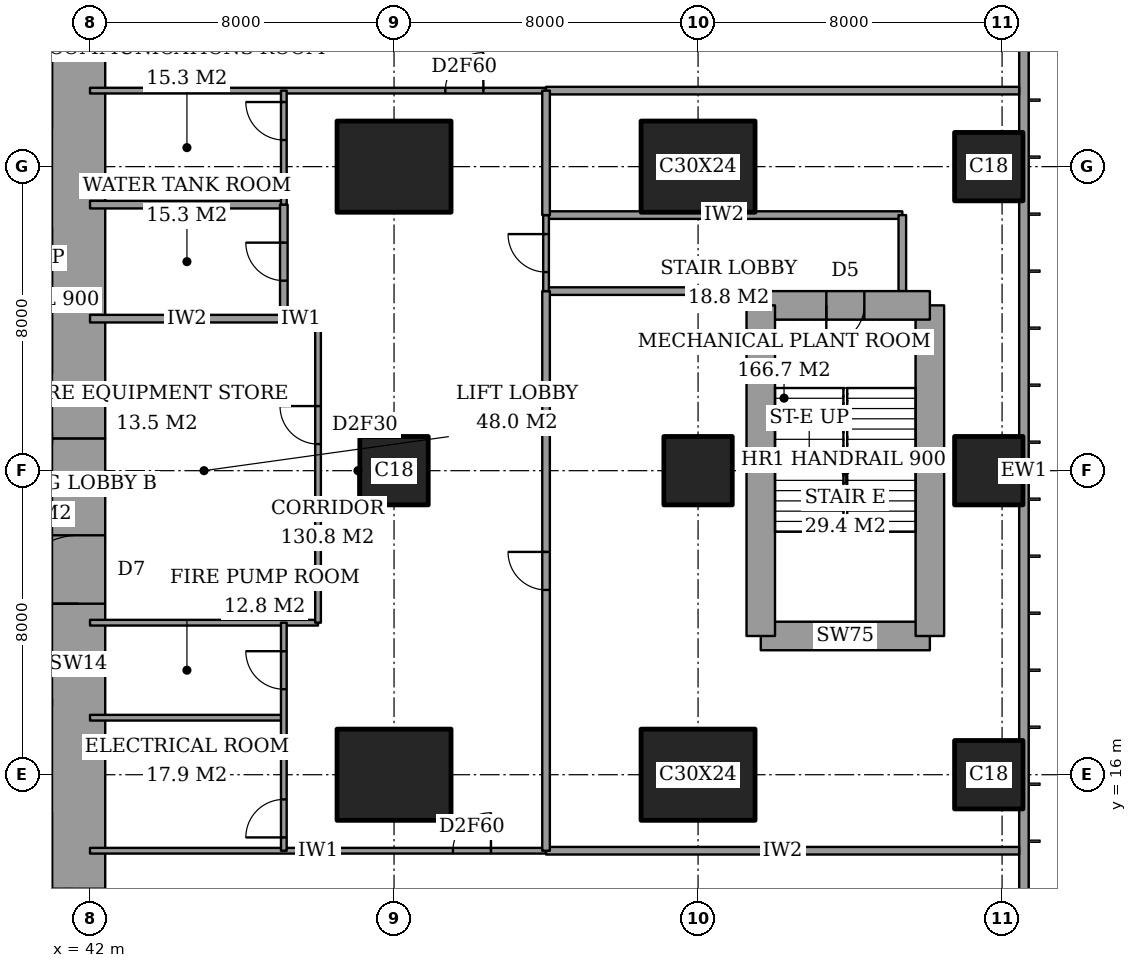
"""IFC4 building model, lengths in metres.
Left out: names, types, materials, properties, quantities, classifications, styles, units other than length and angle.
Written with IfcOpenShell. Run it as: python <this file> out.ifc"""

import sys

from ifc_helpers import new_model, si_unit, direction, frame, frame_2d, origin, origin_2d, place, context, subcontext, project, spatial, rectangle, extrude, element, fill, save


model = new_model("IFC4")
c1 = context("Model", 3, precision=1e-05, world=origin(), true_north=direction((0.0, 1.0)))
c2 = subcontext(c1, "Body", "Model", "MODEL_VIEW")
j1 = project(units=[si_unit("LENGTHUNIT", "METRE"), si_unit("PLANEANGLEUNIT", "RADIAN")], contexts=[c1])
p1 = place(None, origin())
s1 = spatial("IfcSite", under=j1, at=p1, CompositionType="ELEMENT")
p2 = place(p1, origin())
s2 = spatial("IfcBuilding", under=s1, at=p2, CompositionType="ELEMENT")
p3 = place(p2, frame((0.0, 0.0, 171.8)))
s3 = spatial("IfcBuildingStorey", under=s2, at=p3, CompositionType="ELEMENT", Elevation=171.8)
p4 = place(p3, frame((50.0, 16.0, 0.0), z_axis=(0.0, 0.0, 1.0), x_axis=(1.0, 0.0, 0.0)))
e1 = element("IfcColumn", 1, at=p4, inside=s3, PredefinedType="COLUMN", context=c2, shape_type="SweptSolid", body=[
    extrude(rectangle(XDim=3.0, YDim=2.4, at=origin_2d()), origin(), (0.0, 0.0, 1.0), 5.4),
])
p5 = place(p3, frame((50.0, 24.0, 0.0), z_axis=(0.0, 0.0, 1.0), x_axis=(1.0, 0.0, 0.0)))
e2 = element("IfcColumn", 2, at=p5, inside=s3, PredefinedType="COLUMN", context=c2, shape_type="SweptSolid", body=[
    extrude(rectangle(XDim=1.8, YDim=1.8, at=origin_2d()), origin(), (0.0, 0.0, 1.0), 5.4),
])
for number, where, z_axis, x_axis in (
    (3, (50.0, 32.0, 0.0), (0.0, 0.0, 1.0), (1.0, 0.0, 0.0)),
    (4, (58.0, 16.0, 0.0), (0.0, 0.0, 1.0), (1.0, 0.0, 0.0)),
):
    element("IfcColumn", number, at=place(p3, frame(where, z_axis=z_axis, x_axis=x_axis)), inside=s3, PredefinedType="COLUMN", context=c2, shape_type="SweptSolid", body=[
        extrude(rectangle(XDim=3.0, YDim=2.4, at=origin_2d()), origin(), (0.0, 0.0, 1.0), 5.4),
    ])
p6 = place(p3, frame((58.0, 24.0, 0.0), z_axis=(0.0, 0.0, 1.0), x_axis=(1.0, 0.0, 0.0)))
e5 = element("IfcColumn", 5, at=p6, inside=s3, PredefinedType="COLUMN", context=c2, shape_type="SweptSolid", body=[
    extrude(rectangle(XDim=1.8, YDim=1.8, at=origin_2d()), origin(), (0.0, 0.0, 1.0), 5.4),
])
p7 = place(p3, frame((58.0, 32.0, 0.0), z_axis=(0.0, 0.0, 1.0), x_axis=(1.0, 0.0, 0.0)))
e6 = element("IfcColumn", 6, at=p7, inside=s3, PredefinedType="COLUMN", context=c2, shape_type="SweptSolid", body=[
    extrude(rectangle(XDim=3.0, YDim=2.4, at=origin_2d()), origin(), (0.0, 0.0, 1.0), 5.4),
])
for number, where, z_axis, x_axis in (
    (7, (65.65, 16.0, 0.0), (0.0, 0.0, 1.0), (1.0, 0.0, 0.0)),
    (8, (65.65, 24.0, 0.0), (0.0, 0.0, 1.0), (1.0, 0.0, 0.0)),
    (9, (65.65, 32.0, 0.0), (0.0, 0.0, 1.0), (1.0, 0.0, 0.0)),
):
    element("IfcColumn", number, at=place(p3, frame(where, z_axis=z_axis, x_axis=x_axis)), inside=s3, PredefinedType="COLUMN", context=c2, shape_type="SweptSolid", body=[
        extrude(rectangle(XDim=1.8, YDim=1.8, at=origin_2d()), origin(), (0.0, 0.0, 1.0), 5.4),
    ])
p8 = place(p3, frame((41.7, 13.0, 0.0), z_axis=(0.0, 0.0, 1.0), x_axis=(0.0, 1.0, 0.0)))
e10 = element("IfcWall", 10, at=p8, inside=s3, PredefinedType="SHEAR", context=c2, shape_type="SweptSolid", body=[
    extrude(rectangle(XDim=11.85, YDim=1.4, at=frame_2d((5.925, 0.0))), origin(), (0.0, 0.0, 1.0), 5.4),
])
p9 = place(p8, frame((7.5, 0.0, 0.0)))
e11 = element("IfcOpeningElement", 11, at=p9, cuts=e10, PredefinedType="OPENING", context=c2, shape_type="SweptSolid", body=[
    extrude(rectangle(XDim=1.8, YDim=2.4, at=frame_2d((0.9, 1.2))), frame((0.0, 0.71, 0.0), z_axis=(0.0, -1.0, 0.0), x_axis=(1.0, 0.0, 0.0)), (0.0, 0.0, 1.0), 1.42),
])
p10 = place(p3, frame((41.7, 24.85, 0.0), z_axis=(0.0, 0.0, 1.0), x_axis=(0.0, 1.0, 0.0)))
e12 = element("IfcWall", 12, at=p10, inside=s3, PredefinedType="SHEAR", context=c2, shape_type="SweptSolid", body=[
    extrude(rectangle(XDim=10.15, YDim=1.4, at=frame_2d((5.075, 0.0))), origin(), (0.0, 0.0, 1.0), 5.4),
])
p11 = place(p3, frame((59.65, 19.65, 0.0), z_axis=(0.0, 0.0, 1.0), x_axis=(1.0, 0.0, 0.0)))
e13 = element("IfcWall", 13, at=p11, inside=s3, PredefinedType="SHEAR", context=c2, shape_type="SweptSolid", body=[
    extrude(rectangle(XDim=4.45, YDim=0.75, at=frame_2d((2.225, 0.0))), origin(), (0.0, 0.0, 1.0), 5.4),
])
p12 = place(p3, frame((64.1, 19.65, 0.0), z_axis=(0.0, 0.0, 1.0), x_axis=(0.0, 1.0, 0.0)))
e14 = element("IfcWall", 14, at=p12, inside=s3, PredefinedType="SHEAR", context=c2, shape_type="SweptSolid", body=[
    extrude(rectangle(XDim=8.7, YDim=0.75, at=frame_2d((4.35, 0.0))), origin(), (0.0, 0.0, 1.0), 5.4),
])
p13 = place(p3, frame((64.1, 28.35, 0.0), z_axis=(0.0, 0.0, 1.0), x_axis=(-1.0, 0.0, 0.0)))
e15 = element("IfcWall", 15, at=p13, inside=s3, PredefinedType="SHEAR", context=c2, shape_type="SweptSolid", body=[
    extrude(rectangle(XDim=4.45, YDim=0.75, at=frame_2d((2.225, 0.0))), origin(), (0.0, 0.0, 1.0), 5.4),
])
p14 = place(p13, frame((1.725, 0.0, 0.0)))
e16 = element("IfcOpeningElement", 16, at=p14, cuts=e15, PredefinedType="OPENING", context=c2, shape_type="SweptSolid", body=[
    extrude(rectangle(XDim=1.0, YDim=2.1, at=frame_2d((0.5, 1.05))), frame((0.0, 0.385, 0.0), z_axis=(0.0, -1.0, 0.0), x_axis=(1.0, 0.0, 0.0)), (0.0, 0.0, 1.0), 0.77),
])
p15 = place(p3, frame((59.65, 28.35, 0.0), z_axis=(0.0, 0.0, 1.0), x_axis=(0.0, -1.0, 0.0)))
e17 = element("IfcWall", 17, at=p15, inside=s3, PredefinedType="SHEAR", context=c2, shape_type="SweptSolid", body=[
    extrude(rectangle(XDim=8.7, YDim=0.75, at=frame_2d((4.35, 0.0))), origin(), (0.0, 0.0, 1.0), 5.4),
])
p16 = place(p3, frame((66.575, 3.175, 0.0), z_axis=(0.0, 0.0, 1.0), x_axis=(0.0, 1.0, 0.0)))
e18 = element("IfcWall", 18, at=p16, inside=s3, PredefinedType="SOLIDWALL", context=c2, shape_type="SweptSolid", body=[
    extrude(rectangle(XDim=41.65, YDim=0.25, at=frame_2d((20.825, 0.0))), origin(), (0.0, 0.0, 1.0), 5.4),
])
p17 = place(p16, frame((0.825, 0.0, 0.9)))
e19 = element("IfcOpeningElement", 19, at=p17, cuts=e18, PredefinedType="OPENING", context=c2, shape_type="SweptSolid", body=[
    extrude(rectangle(XDim=2.4, YDim=2.4, at=frame_2d((1.2, 1.2))), frame((0.0, 0.135, 0.0), z_axis=(0.0, -1.0, 0.0), x_axis=(1.0, 0.0, 0.0)), (0.0, 0.0, 1.0), 0.27),
])
p18 = place(p16, frame((38.425, 0.0, 0.9)))
e20 = element("IfcOpeningElement", 20, at=p18, cuts=e18, PredefinedType="OPENING", context=c2, shape_type="SweptSolid", body=[
    extrude(rectangle(XDim=2.4, YDim=2.4, at=frame_2d((1.2, 1.2))), frame((0.0, 0.135, 0.0), z_axis=(0.0, -1.0, 0.0), x_axis=(1.0, 0.0, 0.0)), (0.0, 0.0, 1.0), 0.27),
])
p19 = place(p3, frame((54.0, 14.0, 0.0), z_axis=(0.0, 0.0, 1.0), x_axis=(1.0, 0.0, 0.0)))
e21 = element("IfcWall", 21, at=p19, inside=s3, PredefinedType="PARTITIONING", context=c2, shape_type="SweptSolid", body=[
    extrude(rectangle(XDim=12.45, YDim=0.2, at=frame_2d((6.225, 0.0))), origin(), (0.0, 0.0, 1.0), 5.15),
])
p20 = place(p3, frame((42.0, 14.0, 0.0), z_axis=(0.0, 0.0, 1.0), x_axis=(1.0, 0.0, 0.0)))
e22 = element("IfcWall", 22, at=p20, inside=s3, PredefinedType="PARTITIONING", context=c2, shape_type="SweptSolid", body=[
    extrude(rectangle(XDim=12.0, YDim=0.15, at=frame_2d((6.0, 0.0))), origin(), (0.0, 0.0, 1.0), 5.15),
])
p21 = place(p20, frame((9.55, 0.0, 0.0)))
e23 = element("IfcOpeningElement", 23, at=p21, cuts=e22, PredefinedType="OPENING", context=c2, shape_type="SweptSolid", body=[
    extrude(rectangle(XDim=1.0, YDim=2.1, at=frame_2d((0.5, 1.05))), frame((0.0, 0.085, 0.0), z_axis=(0.0, -1.0, 0.0), x_axis=(1.0, 0.0, 0.0)), (0.0, 0.0, 1.0), 0.17),
])
p22 = place(p3, frame((42.0, 17.5, 0.0), z_axis=(0.0, 0.0, 1.0), x_axis=(1.0, 0.0, 0.0)))
e24 = element("IfcWall", 24, at=p22, inside=s3, PredefinedType="PARTITIONING", context=c2, shape_type="SweptSolid", body=[
    extrude(rectangle(XDim=5.1, YDim=0.15, at=frame_2d((2.55, 0.0))), origin(), (0.0, 0.0, 1.0), 5.15),
])
p23 = place(p3, frame((42.0, 20.0, 0.0), z_axis=(0.0, 0.0, 1.0), x_axis=(1.0, 0.0, 0.0)))
e25 = element("IfcWall", 25, at=p23, inside=s3, PredefinedType="PARTITIONING", context=c2, shape_type="SweptSolid", body=[
    extrude(rectangle(XDim=6.0, YDim=0.15, at=frame_2d((3.0, 0.0))), origin(), (0.0, 0.0, 1.0), 5.15),
])
p24 = place(p3, frame((42.0, 28.0, 0.0), z_axis=(0.0, 0.0, 1.0), x_axis=(1.0, 0.0, 0.0)))
e26 = element("IfcWall", 26, at=p24, inside=s3, PredefinedType="PARTITIONING", context=c2, shape_type="SweptSolid", body=[
    extrude(rectangle(XDim=5.1, YDim=0.2, at=frame_2d((2.55, 0.0))), origin(), (0.0, 0.0, 1.0), 5.15),
])
p25 = place(p3, frame((47.1, 28.0, 0.0), z_axis=(0.0, 0.0, 1.0), x_axis=(1.0, 0.0, 0.0)))
e27 = element("IfcWall", 27, at=p25, inside=s3, PredefinedType="PARTITIONING", context=c2, shape_type="SweptSolid", body=[
    extrude(rectangle(XDim=0.9, YDim=0.15, at=frame_2d((0.45, 0.0))), origin(), (0.0, 0.0, 1.0), 5.15),
])
p26 = place(p3, frame((54.0, 28.725, 0.0), z_axis=(0.0, 0.0, 1.0), x_axis=(1.0, 0.0, 0.0)))
e28 = element("IfcWall", 28, at=p26, inside=s3, PredefinedType="PARTITIONING", context=c2, shape_type="SweptSolid", body=[
    extrude(rectangle(XDim=5.65, YDim=0.2, at=frame_2d((2.825, 0.0))), origin(), (0.0, 0.0, 1.0), 5.15),
])
p27 = place(p3, frame((54.0, 30.725, 0.0), z_axis=(0.0, 0.0, 1.0), x_axis=(1.0, 0.0, 0.0)))
e29 = element("IfcWall", 29, at=p27, inside=s3, PredefinedType="PARTITIONING", context=c2, shape_type="SweptSolid", body=[
    extrude(rectangle(XDim=9.375, YDim=0.2, at=frame_2d((4.688, 0.0))), origin(), (0.0, 0.0, 1.0), 5.15),
])
p28 = place(p3, frame((42.0, 31.0, 0.0), z_axis=(0.0, 0.0, 1.0), x_axis=(1.0, 0.0, 0.0)))
e30 = element("IfcWall", 30, at=p28, inside=s3, PredefinedType="PARTITIONING", context=c2, shape_type="SweptSolid", body=[
    extrude(rectangle(XDim=5.1, YDim=0.2, at=frame_2d((2.55, 0.0))), origin(), (0.0, 0.0, 1.0), 5.15),
])
p29 = place(p3, frame((54.0, 34.0, 0.0), z_axis=(0.0, 0.0, 1.0), x_axis=(1.0, 0.0, 0.0)))
e31 = element("IfcWall", 31, at=p29, inside=s3, PredefinedType="PARTITIONING", context=c2, shape_type="SweptSolid", body=[
    extrude(rectangle(XDim=12.45, YDim=0.2, at=frame_2d((6.225, 0.0))), origin(), (0.0, 0.0, 1.0), 5.15),
])
p30 = place(p3, frame((42.0, 34.0, 0.0), z_axis=(0.0, 0.0, 1.0), x_axis=(1.0, 0.0, 0.0)))
e32 = element("IfcWall", 32, at=p30, inside=s3, PredefinedType="PARTITIONING", context=c2, shape_type="SweptSolid", body=[
    extrude(rectangle(XDim=12.0, YDim=0.15, at=frame_2d((6.0, 0.0))), origin(), (0.0, 0.0, 1.0), 5.15),
])
p31 = place(p30, frame((9.35, 0.0, 0.0)))
e33 = element("IfcOpeningElement", 33, at=p31, cuts=e32, PredefinedType="OPENING", context=c2, shape_type="SweptSolid", body=[
    extrude(rectangle(XDim=1.0, YDim=2.1, at=frame_2d((0.5, 1.05))), frame((0.0, 0.085, 0.0), z_axis=(0.0, -1.0, 0.0), x_axis=(1.0, 0.0, 0.0)), (0.0, 0.0, 1.0), 0.17),
])
p32 = place(p3, frame((47.1, 28.0, 0.0), z_axis=(0.0, 0.0, 1.0), x_axis=(0.0, 1.0, 0.0)))
e34 = element("IfcWall", 34, at=p32, inside=s3, PredefinedType="PARTITIONING", context=c2, shape_type="SweptSolid", body=[
    extrude(rectangle(XDim=3.0, YDim=0.2, at=frame_2d((1.5, 0.0))), origin(), (0.0, 0.0, 1.0), 5.15),
])
p33 = place(p32, frame((1.0, 0.0, 0.0)))
e35 = element("IfcOpeningElement", 35, at=p33, cuts=e34, PredefinedType="OPENING", context=c2, shape_type="SweptSolid", body=[
    extrude(rectangle(XDim=1.0, YDim=2.1, at=frame_2d((0.5, 1.05))), frame((0.0, 0.11, 0.0), z_axis=(0.0, -1.0, 0.0), x_axis=(1.0, 0.0, 0.0)), (0.0, 0.0, 1.0), 0.22),
])
p34 = place(p3, frame((47.1, 14.0, 0.0), z_axis=(0.0, 0.0, 1.0), x_axis=(0.0, 1.0, 0.0)))
e36 = element("IfcWall", 36, at=p34, inside=s3, PredefinedType="PARTITIONING", context=c2, shape_type="SweptSolid", body=[
    extrude(rectangle(XDim=6.0, YDim=0.15, at=frame_2d((3.0, 0.0))), origin(), (0.0, 0.0, 1.0), 5.15),
])
p35 = place(p34, frame((0.35, 0.0, 0.0)))
e37 = element("IfcOpeningElement", 37, at=p35, cuts=e36, PredefinedType="OPENING", context=c2, shape_type="SweptSolid", body=[
    extrude(rectangle(XDim=1.0, YDim=2.1, at=frame_2d((0.5, 1.05))), frame((0.0, 0.085, 0.0), z_axis=(0.0, -1.0, 0.0), x_axis=(1.0, 0.0, 0.0)), (0.0, 0.0, 1.0), 0.17),
])
p36 = place(p34, frame((4.25, 0.0, 0.0)))
e38 = element("IfcOpeningElement", 38, at=p36, cuts=e36, PredefinedType="OPENING", context=c2, shape_type="SweptSolid", body=[
    extrude(rectangle(XDim=1.0, YDim=2.1, at=frame_2d((0.5, 1.05))), frame((0.0, 0.085, 0.0), z_axis=(0.0, -1.0, 0.0), x_axis=(1.0, 0.0, 0.0)), (0.0, 0.0, 1.0), 0.17),
])
p37 = place(p3, frame((47.1, 31.0, 0.0), z_axis=(0.0, 0.0, 1.0), x_axis=(0.0, 1.0, 0.0)))
e39 = element("IfcWall", 39, at=p37, inside=s3, PredefinedType="PARTITIONING", context=c2, shape_type="SweptSolid", body=[
    extrude(rectangle(XDim=3.0, YDim=0.15, at=frame_2d((1.5, 0.0))), origin(), (0.0, 0.0, 1.0), 5.15),
])
p38 = place(p37, frame((1.7, 0.0, 0.0)))
e40 = element("IfcOpeningElement", 40, at=p38, cuts=e39, PredefinedType="OPENING", context=c2, shape_type="SweptSolid", body=[
    extrude(rectangle(XDim=1.0, YDim=2.1, at=frame_2d((0.5, 1.05))), frame((0.0, 0.085, 0.0), z_axis=(0.0, -1.0, 0.0), x_axis=(1.0, 0.0, 0.0)), (0.0, 0.0, 1.0), 0.17),
])
p39 = place(p3, frame((48.0, 20.0, 0.0), z_axis=(0.0, 0.0, 1.0), x_axis=(0.0, 1.0, 0.0)))
e41 = element("IfcWall", 41, at=p39, inside=s3, PredefinedType="PARTITIONING", context=c2, shape_type="SweptSolid", body=[
    extrude(rectangle(XDim=8.0, YDim=0.15, at=frame_2d((4.0, 0.0))), origin(), (0.0, 0.0, 1.0), 5.15),
])
p40 = place(p39, frame((4.7, 0.0, 0.0)))
e42 = element("IfcOpeningElement", 42, at=p40, cuts=e41, PredefinedType="OPENING", context=c2, shape_type="SweptSolid", body=[
    extrude(rectangle(XDim=1.0, YDim=2.1, at=frame_2d((0.5, 1.05))), frame((0.0, 0.085, 0.0), z_axis=(0.0, -1.0, 0.0), x_axis=(1.0, 0.0, 0.0)), (0.0, 0.0, 1.0), 0.17),
])
p41 = place(p3, frame((54.0, 14.0, 0.0), z_axis=(0.0, 0.0, 1.0), x_axis=(0.0, 1.0, 0.0)))
e43 = element("IfcWall", 43, at=p41, inside=s3, PredefinedType="PARTITIONING", context=c2, shape_type="SweptSolid", body=[
    extrude(rectangle(XDim=14.725, YDim=0.2, at=frame_2d((7.363, 0.0))), origin(), (0.0, 0.0, 1.0), 5.15),
])
p42 = place(p41, frame((6.863, 0.0, 0.0)))
e44 = element("IfcOpeningElement", 44, at=p42, cuts=e43, PredefinedType="OPENING", context=c2, shape_type="SweptSolid", body=[
    extrude(rectangle(XDim=1.0, YDim=2.1, at=frame_2d((0.5, 1.05))), frame((0.0, 0.11, 0.0), z_axis=(0.0, -1.0, 0.0), x_axis=(1.0, 0.0, 0.0)), (0.0, 0.0, 1.0), 0.22),
])
p43 = place(p3, frame((54.0, 30.725, 0.0), z_axis=(0.0, 0.0, 1.0), x_axis=(0.0, 1.0, 0.0)))
e45 = element("IfcWall", 45, at=p43, inside=s3, PredefinedType="PARTITIONING", context=c2, shape_type="SweptSolid", body=[
    extrude(rectangle(XDim=3.275, YDim=0.2, at=frame_2d((1.637, 0.0))), origin(), (0.0, 0.0, 1.0), 5.15),
])
p44 = place(p3, frame((54.0, 28.725, 0.0), z_axis=(0.0, 0.0, 1.0), x_axis=(0.0, 1.0, 0.0)))
e46 = element("IfcWall", 46, at=p44, inside=s3, PredefinedType="PARTITIONING", context=c2, shape_type="SweptSolid", body=[
    extrude(rectangle(XDim=2.0, YDim=0.15, at=frame_2d((1.0, 0.0))), origin(), (0.0, 0.0, 1.0), 5.15),
])
p45 = place(p44, frame((0.5, 0.0, 0.0)))
e47 = element("IfcOpeningElement", 47, at=p45, cuts=e46, PredefinedType="OPENING", context=c2, shape_type="SweptSolid", body=[
    extrude(rectangle(XDim=1.0, YDim=2.1, at=frame_2d((0.5, 1.05))), frame((0.0, 0.085, 0.0), z_axis=(0.0, -1.0, 0.0), x_axis=(1.0, 0.0, 0.0)), (0.0, 0.0, 1.0), 0.17),
])
p46 = place(p3, frame((63.375, 28.725, 0.0), z_axis=(0.0, 0.0, 1.0), x_axis=(0.0, 1.0, 0.0)))
e48 = element("IfcWall", 48, at=p46, inside=s3, PredefinedType="PARTITIONING", context=c2, shape_type="SweptSolid", body=[
    extrude(rectangle(XDim=2.0, YDim=0.2, at=frame_2d((1.0, 0.0))), origin(), (0.0, 0.0, 1.0), 5.15),
])
p47 = place(p3, frame((28.3, 17.9, 0.0), z_axis=(0.0, 0.0, 1.0), x_axis=(1.0, 0.0, 0.0)))
e49 = element("IfcWall", 49, at=p47, inside=s3, PredefinedType="PARTITIONING", context=c2, shape_type="SweptSolid", body=[
    extrude(rectangle(XDim=12.7, YDim=0.2, at=frame_2d((6.35, 0.0))), origin(), (0.0, 0.0, 1.0), 5.4),
])
p48 = place(p47, frame((0.95, 0.0, 0.0)))
e50 = element("IfcOpeningElement", 50, at=p48, cuts=e49, PredefinedType="OPENING", context=c2, shape_type="SweptSolid", body=[
    extrude(rectangle(XDim=1.1, YDim=2.1, at=frame_2d((0.55, 1.05))), frame((0.0, 0.11, 0.0), z_axis=(0.0, -1.0, 0.0), x_axis=(1.0, 0.0, 0.0)), (0.0, 0.0, 1.0), 0.22),
])
p49 = place(p47, frame((4.15, 0.0, 0.0)))
e51 = element("IfcOpeningElement", 51, at=p49, cuts=e49, PredefinedType="OPENING", context=c2, shape_type="SweptSolid", body=[
    extrude(rectangle(XDim=1.1, YDim=2.1, at=frame_2d((0.55, 1.05))), frame((0.0, 0.11, 0.0), z_axis=(0.0, -1.0, 0.0), x_axis=(1.0, 0.0, 0.0)), (0.0, 0.0, 1.0), 0.22),
])
p50 = place(p47, frame((7.35, 0.0, 0.0)))
e52 = element("IfcOpeningElement", 52, at=p50, cuts=e49, PredefinedType="OPENING", context=c2, shape_type="SweptSolid", body=[
    extrude(rectangle(XDim=1.1, YDim=2.1, at=frame_2d((0.55, 1.05))), frame((0.0, 0.11, 0.0), z_axis=(0.0, -1.0, 0.0), x_axis=(1.0, 0.0, 0.0)), (0.0, 0.0, 1.0), 0.22),
])
p51 = place(p47, frame((10.6, 0.0, 0.0)))
e53 = element("IfcOpeningElement", 53, at=p51, cuts=e49, PredefinedType="OPENING", context=c2, shape_type="SweptSolid", body=[
    extrude(rectangle(XDim=1.2, YDim=2.1, at=frame_2d((0.6, 1.05))), frame((0.0, 0.11, 0.0), z_axis=(0.0, -1.0, 0.0), x_axis=(1.0, 0.0, 0.0)), (0.0, 0.0, 1.0), 0.22),
])
p52 = place(p21, origin())
e54 = element("IfcDoor", 54, at=p52, inside=s3, OperationType="SINGLE_SWING_LEFT", PredefinedType="DOOR", context=c2, shape_type="SweptSolid", body=[
    extrude(rectangle(XDim=1.0, YDim=2.1, at=frame_2d((0.5, 1.05))), frame((0.0, 0.025, 0.0), z_axis=(0.0, -1.0, 0.0), x_axis=(1.0, 0.0, 0.0)), (0.0, 0.0, 1.0), 0.05),
])
fill(e23, e54)
p53 = place(p42, origin())
e55 = element("IfcDoor", 55, at=p53, inside=s3, OperationType="SINGLE_SWING_LEFT", PredefinedType="DOOR", context=c2, shape_type="SweptSolid", body=[
    extrude(rectangle(XDim=1.0, YDim=2.1, at=frame_2d((0.5, 1.05))), frame((0.0, 0.025, 0.0), z_axis=(0.0, -1.0, 0.0), x_axis=(1.0, 0.0, 0.0)), (0.0, 0.0, 1.0), 0.05),
])
fill(e44, e55)
p54 = place(p31, origin())
e56 = element("IfcDoor", 56, at=p54, inside=s3, OperationType="SINGLE_SWING_LEFT", PredefinedType="DOOR", context=c2, shape_type="SweptSolid", body=[
    extrude(rectangle(XDim=1.0, YDim=2.1, at=frame_2d((0.5, 1.05))), frame((0.0, 0.025, 0.0), z_axis=(0.0, -1.0, 0.0), x_axis=(1.0, 0.0, 0.0)), (0.0, 0.0, 1.0), 0.05),
])
fill(e33, e56)
p55 = place(p40, origin())
e57 = element("IfcDoor", 57, at=p55, inside=s3, OperationType="SINGLE_SWING_LEFT", PredefinedType="DOOR", context=c2, shape_type="SweptSolid", body=[
    extrude(rectangle(XDim=1.0, YDim=2.1, at=frame_2d((0.5, 1.05))), frame((0.0, 0.025, 0.0), z_axis=(0.0, -1.0, 0.0), x_axis=(1.0, 0.0, 0.0)), (0.0, 0.0, 1.0), 0.05),
])
fill(e42, e57)
p56 = place(p35, origin())
e58 = element("IfcDoor", 58, at=p56, inside=s3, OperationType="SINGLE_SWING_RIGHT", PredefinedType="DOOR", context=c2, shape_type="SweptSolid", body=[
    extrude(rectangle(XDim=1.0, YDim=2.1, at=frame_2d((0.5, 1.05))), frame((0.0, 0.025, 0.0), z_axis=(0.0, -1.0, 0.0), x_axis=(1.0, 0.0, 0.0)), (0.0, 0.0, 1.0), 0.05),
])
fill(e37, e58)
p57 = place(p36, origin())
e59 = element("IfcDoor", 59, at=p57, inside=s3, OperationType="SINGLE_SWING_LEFT", PredefinedType="DOOR", context=c2, shape_type="SweptSolid", body=[
    extrude(rectangle(XDim=1.0, YDim=2.1, at=frame_2d((0.5, 1.05))), frame((0.0, 0.025, 0.0), z_axis=(0.0, -1.0, 0.0), x_axis=(1.0, 0.0, 0.0)), (0.0, 0.0, 1.0), 0.05),
])
fill(e38, e59)
p58 = place(p33, origin())
e60 = element("IfcDoor", 60, at=p58, inside=s3, OperationType="SINGLE_SWING_LEFT", PredefinedType="DOOR", context=c2, shape_type="SweptSolid", body=[
    extrude(rectangle(XDim=1.0, YDim=2.1, at=frame_2d((0.5, 1.05))), frame((0.0, 0.025, 0.0), z_axis=(0.0, -1.0, 0.0), x_axis=(1.0, 0.0, 0.0)), (0.0, 0.0, 1.0), 0.05),
])
fill(e35, e60)
p59 = place(p38, origin())
e61 = element("IfcDoor", 61, at=p59, inside=s3, OperationType="SINGLE_SWING_LEFT", PredefinedType="DOOR", context=c2, shape_type="SweptSolid", body=[
    extrude(rectangle(XDim=1.0, YDim=2.1, at=frame_2d((0.5, 1.05))), frame((0.0, 0.025, 0.0), z_axis=(0.0, -1.0, 0.0), x_axis=(1.0, 0.0, 0.0)), (0.0, 0.0, 1.0), 0.05),
])
fill(e40, e61)
p60 = place(p45, origin())
e62 = element("IfcDoor", 62, at=p60, inside=s3, OperationType="SINGLE_SWING_LEFT", PredefinedType="DOOR", context=c2, shape_type="SweptSolid", body=[
    extrude(rectangle(XDim=1.0, YDim=2.1, at=frame_2d((0.5, 1.05))), frame((0.0, 0.025, 0.0), z_axis=(0.0, -1.0, 0.0), x_axis=(1.0, 0.0, 0.0)), (0.0, 0.0, 1.0), 0.05),
])
fill(e47, e62)
p61 = place(p9, origin())
e63 = element("IfcDoor", 63, at=p61, inside=s3, OperationType="DOUBLE_DOOR_DOUBLE_SWING", PredefinedType="DOOR", context=c2, shape_type="SweptSolid", body=[
    extrude(rectangle(XDim=1.8, YDim=2.4, at=frame_2d((0.9, 1.2))), frame((0.0, 0.025, 0.0), z_axis=(0.0, -1.0, 0.0), x_axis=(1.0, 0.0, 0.0)), (0.0, 0.0, 1.0), 0.05),
])
fill(e11, e63)
p62 = place(p14, origin())
e64 = element("IfcDoor", 64, at=p62, inside=s3, OperationType="SINGLE_SWING_LEFT", PredefinedType="DOOR", context=c2, shape_type="SweptSolid", body=[
    extrude(rectangle(XDim=1.0, YDim=2.1, at=frame_2d((0.5, 1.05))), frame((0.0, 0.025, 0.0), z_axis=(0.0, -1.0, 0.0), x_axis=(1.0, 0.0, 0.0)), (0.0, 0.0, 1.0), 0.05),
])
fill(e16, e64)
save(model, sys.argv[1])
